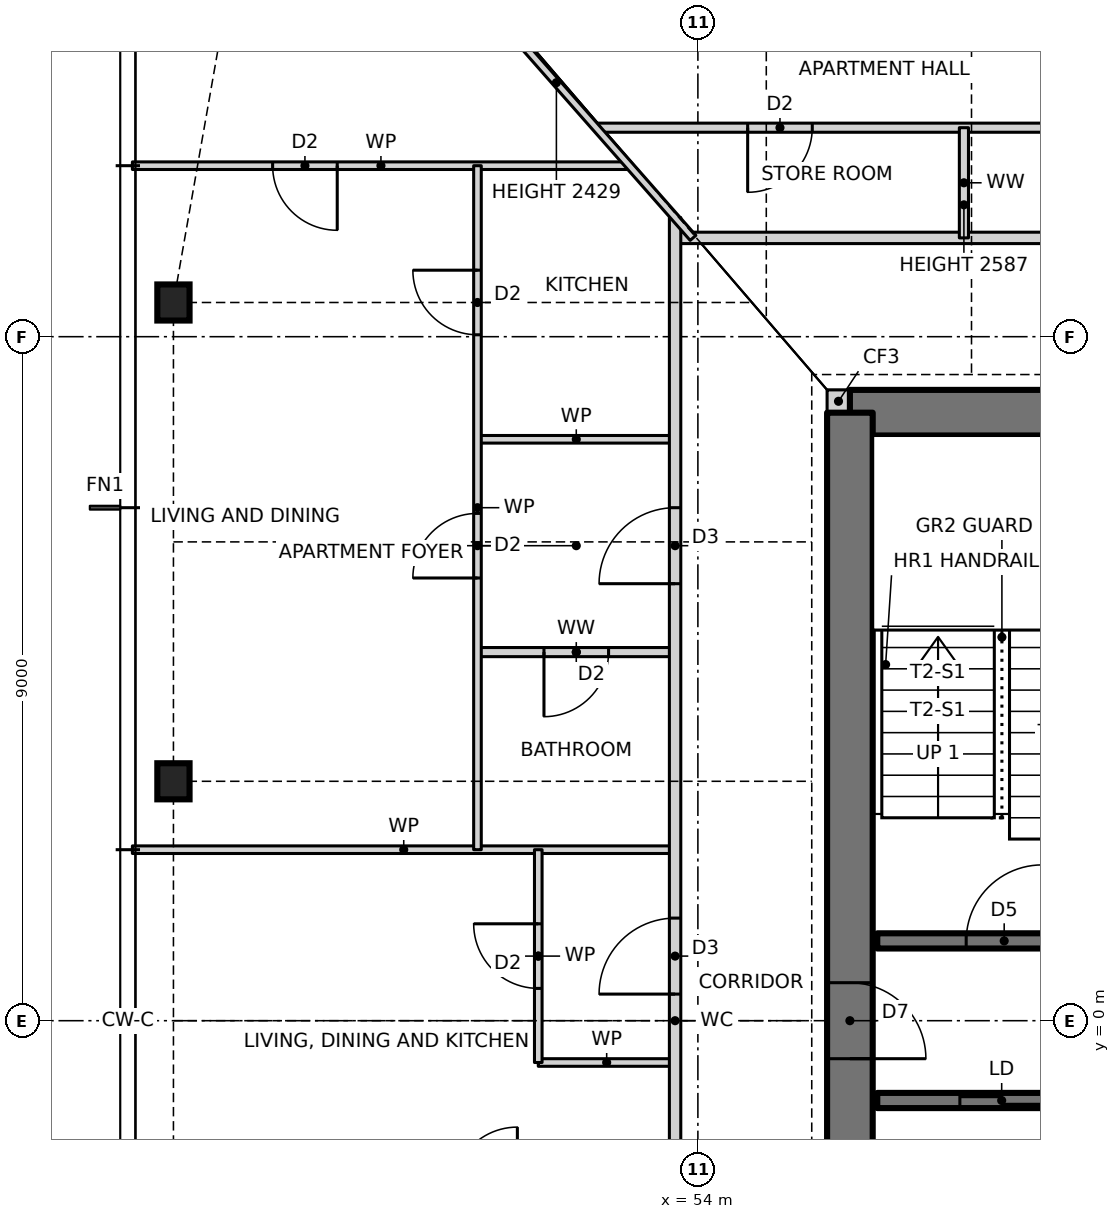
"""IFC4 building model, lengths in metres.
Left out: names, types, materials, properties, quantities, classifications, styles, units other than length and angle.
Written with IfcOpenShell. Run it as: python <this file> out.ifc"""

import sys

from ifc_helpers import new_model, si_unit, direction, frame, frame_2d, origin, origin_2d, place, context, subcontext, project, spatial, rectangle, i_section, extrude, element, fill, save


model = new_model("IFC4")
c1 = context("Model", 3, precision=1e-05, world=origin(), true_north=direction((0.0, 1.0)))
c2 = subcontext(c1, "Body", "Model", "MODEL_VIEW")
j1 = project(units=[si_unit("LENGTHUNIT", "METRE"), si_unit("PLANEANGLEUNIT", "RADIAN")], contexts=[c1])
p1 = place(None, origin())
s1 = spatial("IfcSite", under=j1, at=p1, CompositionType="ELEMENT")
p2 = place(p1, origin())
s2 = spatial("IfcBuilding", under=s1, at=p2, CompositionType="ELEMENT")
p3 = place(p2, frame((0.0, 0.0, 46.5)))
s3 = spatial("IfcBuildingStorey", under=s2, at=p3, CompositionType="ELEMENT", Elevation=46.5)
for number, where, z_axis, x_axis in (
    (1, (47.1, 9.45, 0.0), (0.0, 0.0, 1.0), (1.0, 0.0, 0.0)),
    (2, (47.1, 3.15, 0.0), (0.0, 0.0, 1.0), (1.0, 0.0, 0.0)),
):
    element("IfcColumn", number, at=place(p3, frame(where, z_axis=z_axis, x_axis=x_axis)), inside=s3, PredefinedType="COLUMN", context=c2, shape_type="SweptSolid", body=[
        extrude(i_section(OverallWidth=0.424, OverallDepth=0.475, WebThickness=0.048, FlangeThickness=0.077, at=origin_2d()), origin(), (0.0, 0.0, 1.0), 3.5),
    ])
p4 = place(p3, frame((55.7, 8.15, 0.0), z_axis=(0.0, 0.0, 1.0), x_axis=(1.0, 0.0, 0.0)))
e3 = element("IfcWall", 3, at=p4, inside=s3, PredefinedType="SOLIDWALL", context=c2, shape_type="SweptSolid", body=[
    extrude(rectangle(XDim=0.3, YDim=0.3, at=frame_2d((0.15, 0.0))), origin(), (0.0, 0.0, 1.0), 3.5),
])
p5 = place(p3, frame((70.0, 8.0, 0.0), z_axis=(0.0, 0.0, 1.0), x_axis=(-1.0, 0.0, 0.0)))
e4 = element("IfcWall", 4, at=p5, inside=s3, PredefinedType="SHEAR", context=c2, shape_type="SweptSolid", body=[
    extrude(rectangle(XDim=14.0, YDim=0.6, at=frame_2d((7.0, 0.0))), origin(), (0.0, 0.0, 1.0), 3.5),
])
p6 = place(p5, frame((8.2, 0.0, 0.0)))
e5 = element("IfcOpeningElement", 5, at=p6, cuts=e4, PredefinedType="OPENING", context=c2, shape_type="SweptSolid", body=[
    extrude(rectangle(XDim=0.9, YDim=2.1, at=frame_2d((0.45, 1.05))), frame((0.0, 0.31, 0.0), z_axis=(0.0, -1.0, 0.0), x_axis=(1.0, 0.0, 0.0)), (0.0, 0.0, 1.0), 0.62),
])
p7 = place(p5, frame((3.2, 0.0, 0.0)))
e6 = element("IfcOpeningElement", 6, at=p7, cuts=e4, PredefinedType="OPENING", context=c2, shape_type="SweptSolid", body=[
    extrude(rectangle(XDim=0.9, YDim=2.1, at=frame_2d((0.45, 1.05))), frame((0.0, 0.31, 0.0), z_axis=(0.0, -1.0, 0.0), x_axis=(1.0, 0.0, 0.0)), (0.0, 0.0, 1.0), 0.62),
])
p8 = place(p3, frame((56.0, 8.0, 0.0), z_axis=(0.0, 0.0, 1.0), x_axis=(0.0, -1.0, 0.0)))
e7 = element("IfcWall", 7, at=p8, inside=s3, PredefinedType="SHEAR", context=c2, shape_type="SweptSolid", body=[
    extrude(rectangle(XDim=16.0, YDim=0.6, at=frame_2d((8.0, 0.0))), origin(), (0.0, 0.0, 1.0), 3.5),
])
p9 = place(p8, frame((7.5, 0.0, 0.0)))
e8 = element("IfcOpeningElement", 8, at=p9, cuts=e7, PredefinedType="OPENING", context=c2, shape_type="SweptSolid", body=[
    extrude(rectangle(XDim=1.0, YDim=2.1, at=frame_2d((0.5, 1.05))), frame((0.0, 0.31, 0.0), z_axis=(0.0, -1.0, 0.0), x_axis=(1.0, 0.0, 0.0)), (0.0, 0.0, 1.0), 0.62),
])
p10 = place(p3, frame((56.36, -1.05, 0.0), z_axis=(0.0, 0.0, 1.0), x_axis=(1.0, 0.0, 0.0)))
e9 = element("IfcWall", 9, at=p10, inside=s3, PredefinedType="SOLIDWALL", context=c2, shape_type="SweptSolid", body=[
    extrude(rectangle(XDim=13.28, YDim=0.2, at=frame_2d((6.64, 0.0))), origin(), (0.0, 0.0, 1.0), 3.5),
])
p11 = place(p10, frame((11.11, 0.0, 0.0)))
e10 = element("IfcOpeningElement", 10, at=p11, cuts=e9, PredefinedType="OPENING", context=c2, shape_type="SweptSolid", body=[
    extrude(rectangle(XDim=1.0, YDim=2.1, at=frame_2d((0.5, 1.05))), frame((0.0, 0.11, 0.0), z_axis=(0.0, -1.0, 0.0), x_axis=(1.0, 0.0, 0.0)), (0.0, 0.0, 1.0), 0.22),
])
p12 = place(p10, frame((1.087, 0.0, 0.0)))
e11 = element("IfcOpeningElement", 11, at=p12, cuts=e9, PredefinedType="OPENING", context=c2, shape_type="SweptSolid", body=[
    extrude(rectangle(XDim=1.1, YDim=2.1, at=frame_2d((0.55, 1.05))), frame((0.0, 0.11, 0.0), z_axis=(0.0, -1.0, 0.0), x_axis=(1.0, 0.0, 0.0)), (0.0, 0.0, 1.0), 0.22),
])
p13 = place(p10, frame((4.39, 0.0, 0.0)))
e12 = element("IfcOpeningElement", 12, at=p13, cuts=e9, PredefinedType="OPENING", context=c2, shape_type="SweptSolid", body=[
    extrude(rectangle(XDim=1.1, YDim=2.1, at=frame_2d((0.55, 1.05))), frame((0.0, 0.11, 0.0), z_axis=(0.0, -1.0, 0.0), x_axis=(1.0, 0.0, 0.0)), (0.0, 0.0, 1.0), 0.22),
])
p14 = place(p10, frame((7.724, 0.0, 0.0)))
e13 = element("IfcOpeningElement", 13, at=p14, cuts=e9, PredefinedType="OPENING", context=c2, shape_type="SweptSolid", body=[
    extrude(rectangle(XDim=1.1, YDim=2.1, at=frame_2d((0.55, 1.05))), frame((0.0, 0.11, 0.0), z_axis=(0.0, -1.0, 0.0), x_axis=(1.0, 0.0, 0.0)), (0.0, 0.0, 1.0), 0.22),
])
p15 = place(p3, frame((51.9, -0.55, 0.0), z_axis=(0.0, 0.0, 1.0), x_axis=(1.0, 0.0, 0.0)))
e14 = element("IfcWall", 14, at=p15, inside=s3, PredefinedType="PARTITIONING", context=c2, shape_type="SweptSolid", body=[
    extrude(rectangle(XDim=1.8, YDim=0.1, at=frame_2d((0.9, 0.0))), origin(), (0.0, 0.0, 1.0), 3.27),
])
p16 = place(p3, frame((56.36, 1.05, 0.0), z_axis=(0.0, 0.0, 1.0), x_axis=(1.0, 0.0, 0.0)))
e15 = element("IfcWall", 15, at=p16, inside=s3, PredefinedType="SOLIDWALL", context=c2, shape_type="SweptSolid", body=[
    extrude(rectangle(XDim=13.28, YDim=0.2, at=frame_2d((6.64, 0.0))), origin(), (0.0, 0.0, 1.0), 3.5),
])
p17 = place(p16, frame((1.17, 0.0, 0.0)))
e16 = element("IfcOpeningElement", 16, at=p17, cuts=e15, PredefinedType="OPENING", context=c2, shape_type="SweptSolid", body=[
    extrude(rectangle(XDim=1.0, YDim=2.1, at=frame_2d((0.5, 1.05))), frame((0.0, 0.11, 0.0), z_axis=(0.0, -1.0, 0.0), x_axis=(1.0, 0.0, 0.0)), (0.0, 0.0, 1.0), 0.22),
])
p18 = place(p16, frame((6.94, 0.0, 0.0)))
e17 = element("IfcOpeningElement", 17, at=p18, cuts=e15, PredefinedType="OPENING", context=c2, shape_type="SweptSolid", body=[
    extrude(rectangle(XDim=0.9, YDim=2.1, at=frame_2d((0.45, 1.05))), frame((0.0, 0.11, 0.0), z_axis=(0.0, -1.0, 0.0), x_axis=(1.0, 0.0, 0.0)), (0.0, 0.0, 1.0), 0.22),
])
p19 = place(p16, frame((3.64, 0.0, 0.0)))
e18 = element("IfcOpeningElement", 18, at=p19, cuts=e15, PredefinedType="OPENING", context=c2, shape_type="SweptSolid", body=[
    extrude(rectangle(XDim=0.9, YDim=2.1, at=frame_2d((0.45, 1.05))), frame((0.0, 0.11, 0.0), z_axis=(0.0, -1.0, 0.0), x_axis=(1.0, 0.0, 0.0)), (0.0, 0.0, 1.0), 0.22),
])
p20 = place(p16, frame((10.96, 0.0, 0.0)))
e19 = element("IfcOpeningElement", 19, at=p20, cuts=e15, PredefinedType="OPENING", context=c2, shape_type="SweptSolid", body=[
    extrude(rectangle(XDim=1.3, YDim=2.1, at=frame_2d((0.65, 1.05))), frame((0.0, 0.11, 0.0), z_axis=(0.0, -1.0, 0.0), x_axis=(1.0, 0.0, 0.0)), (0.0, 0.0, 1.0), 0.22),
])
p21 = place(p3, frame((46.56, 2.25, 0.0), z_axis=(0.0, 0.0, 1.0), x_axis=(1.0, 0.0, 0.0)))
e20 = element("IfcWall", 20, at=p21, inside=s3, PredefinedType="PARTITIONING", context=c2, shape_type="SweptSolid", body=[
    extrude(rectangle(XDim=7.14, YDim=0.1, at=frame_2d((3.57, 0.0))), origin(), (0.0, 0.0, 1.0), 3.27),
])
p22 = place(p3, frame((51.1, 4.85, 0.0), z_axis=(0.0, 0.0, 1.0), x_axis=(1.0, 0.0, 0.0)))
e21 = element("IfcWall", 21, at=p22, inside=s3, PredefinedType="PARTITIONING", context=c2, shape_type="SweptSolid", body=[
    extrude(rectangle(XDim=2.6, YDim=0.12, at=frame_2d((1.3, 0.0))), origin(), (0.0, 0.0, 1.0), 3.27),
])
p23 = place(p22, frame((0.875, 0.0, 0.0)))
e22 = element("IfcOpeningElement", 22, at=p23, cuts=e21, PredefinedType="OPENING", context=c2, shape_type="SweptSolid", body=[
    extrude(rectangle(XDim=0.85, YDim=2.1, at=frame_2d((0.425, 1.05))), frame((0.0, 0.07, 0.0), z_axis=(0.0, -1.0, 0.0), x_axis=(1.0, 0.0, 0.0)), (0.0, 0.0, 1.0), 0.14),
])
p24 = place(p3, frame((51.1, 7.65, 0.0), z_axis=(0.0, 0.0, 1.0), x_axis=(1.0, 0.0, 0.0)))
e23 = element("IfcWall", 23, at=p24, inside=s3, PredefinedType="PARTITIONING", context=c2, shape_type="SweptSolid", body=[
    extrude(rectangle(XDim=2.6, YDim=0.1, at=frame_2d((1.3, 0.0))), origin(), (0.0, 0.0, 1.0), 3.27),
])
p25 = place(p3, frame((53.7, 10.3, 0.0), z_axis=(0.0, 0.0, 1.0), x_axis=(1.0, 0.0, 0.0)))
e24 = element("IfcWall", 24, at=p25, inside=s3, PredefinedType="PARTITIONING", context=c2, shape_type="SweptSolid", body=[
    extrude(rectangle(XDim=18.6, YDim=0.15, at=frame_2d((9.3, 0.0))), origin(), (0.0, 0.0, 1.0), 3.27),
])
p26 = place(p25, frame((12.8, 0.0, 0.0)))
e25 = element("IfcOpeningElement", 25, at=p26, cuts=e24, PredefinedType="OPENING", context=c2, shape_type="SweptSolid", body=[
    extrude(rectangle(XDim=1.0, YDim=2.1, at=frame_2d((0.5, 1.05))), frame((0.0, 0.085, 0.0), z_axis=(0.0, -1.0, 0.0), x_axis=(1.0, 0.0, 0.0)), (0.0, 0.0, 1.0), 0.17),
])
p27 = place(p3, frame((46.56, 11.25, 0.0), z_axis=(0.0, 0.0, 1.0), x_axis=(1.0, 0.0, 0.0)))
e26 = element("IfcWall", 26, at=p27, inside=s3, PredefinedType="PARTITIONING", context=c2, shape_type="SweptSolid", body=[
    extrude(rectangle(XDim=6.54, YDim=0.1, at=frame_2d((3.27, 0.0))), origin(), (0.0, 0.0, 1.0), 3.27),
])
p28 = place(p27, frame((1.845, 0.0, 0.0)))
e27 = element("IfcOpeningElement", 27, at=p28, cuts=e26, PredefinedType="OPENING", context=c2, shape_type="SweptSolid", body=[
    extrude(rectangle(XDim=0.85, YDim=2.1, at=frame_2d((0.425, 1.05))), frame((0.0, 0.06, 0.0), z_axis=(0.0, -1.0, 0.0), x_axis=(1.0, 0.0, 0.0)), (0.0, 0.0, 1.0), 0.12),
])
p29 = place(p3, frame((52.66, 11.75, 0.0), z_axis=(0.0, 0.0, 1.0), x_axis=(1.0, 0.0, 0.0)))
e28 = element("IfcWall", 28, at=p29, inside=s3, PredefinedType="PARTITIONING", context=c2, shape_type="SweptSolid", body=[
    extrude(rectangle(XDim=19.34, YDim=0.12, at=frame_2d((9.67, 0.0))), origin(), (0.0, 0.0, 1.0), 3.27),
])
p30 = place(p29, frame((17.115, 0.0, 0.0)))
e29 = element("IfcOpeningElement", 29, at=p30, cuts=e28, PredefinedType="OPENING", context=c2, shape_type="SweptSolid", body=[
    extrude(rectangle(XDim=0.85, YDim=2.1, at=frame_2d((0.425, 1.05))), frame((0.0, 0.07, 0.0), z_axis=(0.0, -1.0, 0.0), x_axis=(1.0, 0.0, 0.0)), (0.0, 0.0, 1.0), 0.14),
])
p31 = place(p29, frame((13.915, 0.0, 0.0)))
e30 = element("IfcOpeningElement", 30, at=p31, cuts=e28, PredefinedType="OPENING", context=c2, shape_type="SweptSolid", body=[
    extrude(rectangle(XDim=0.85, YDim=2.1, at=frame_2d((0.425, 1.05))), frame((0.0, 0.07, 0.0), z_axis=(0.0, -1.0, 0.0), x_axis=(1.0, 0.0, 0.0)), (0.0, 0.0, 1.0), 0.14),
])
p32 = place(p29, frame((7.165, 0.0, 0.0)))
e31 = element("IfcOpeningElement", 31, at=p32, cuts=e28, PredefinedType="OPENING", context=c2, shape_type="SweptSolid", body=[
    extrude(rectangle(XDim=0.85, YDim=2.1, at=frame_2d((0.425, 1.05))), frame((0.0, 0.07, 0.0), z_axis=(0.0, -1.0, 0.0), x_axis=(1.0, 0.0, 0.0)), (0.0, 0.0, 1.0), 0.14),
])
p33 = place(p29, frame((1.995, 0.0, 0.0)))
e32 = element("IfcOpeningElement", 32, at=p33, cuts=e28, PredefinedType="OPENING", context=c2, shape_type="SweptSolid", body=[
    extrude(rectangle(XDim=0.85, YDim=2.1, at=frame_2d((0.425, 1.05))), frame((0.0, 0.07, 0.0), z_axis=(0.0, -1.0, 0.0), x_axis=(1.0, 0.0, 0.0)), (0.0, 0.0, 1.0), 0.14),
])
p34 = place(p3, frame((57.5, 10.3, 0.0), z_axis=(0.0, 0.0, 1.0), x_axis=(0.0, 1.0, 0.0)))
e33 = element("IfcWall", 33, at=p34, inside=s3, PredefinedType="PARTITIONING", context=c2, shape_type="SweptSolid", body=[
    extrude(rectangle(XDim=1.45, YDim=0.12, at=frame_2d((0.725, 0.0))), origin(), (0.0, 0.0, 1.0), 2.587),
])
p35 = place(p3, frame((53.7, -10.568, 0.0), z_axis=(0.0, 0.0, 1.0), x_axis=(0.0, 1.0, 0.0)))
e34 = element("IfcWall", 34, at=p35, inside=s3, PredefinedType="PARTITIONING", context=c2, shape_type="SweptSolid", body=[
    extrude(rectangle(XDim=21.136, YDim=0.15, at=frame_2d((10.568, 0.0))), origin(), (0.0, 0.0, 1.0), 3.27),
])
p36 = place(p35, frame((16.318, 0.0, 0.0)))
e35 = element("IfcOpeningElement", 35, at=p36, cuts=e34, PredefinedType="OPENING", context=c2, shape_type="SweptSolid", body=[
    extrude(rectangle(XDim=1.0, YDim=2.1, at=frame_2d((0.5, 1.05))), frame((0.0, 0.085, 0.0), z_axis=(0.0, -1.0, 0.0), x_axis=(1.0, 0.0, 0.0)), (0.0, 0.0, 1.0), 0.17),
])
p37 = place(p35, frame((10.918, 0.0, 0.0)))
e36 = element("IfcOpeningElement", 36, at=p37, cuts=e34, PredefinedType="OPENING", context=c2, shape_type="SweptSolid", body=[
    extrude(rectangle(XDim=1.0, YDim=2.1, at=frame_2d((0.5, 1.05))), frame((0.0, 0.085, 0.0), z_axis=(0.0, -1.0, 0.0), x_axis=(1.0, 0.0, 0.0)), (0.0, 0.0, 1.0), 0.17),
])
p38 = place(p3, frame((51.9, -0.55, 0.0), z_axis=(0.0, 0.0, 1.0), x_axis=(0.0, 1.0, 0.0)))
e37 = element("IfcWall", 37, at=p38, inside=s3, PredefinedType="PARTITIONING", context=c2, shape_type="SweptSolid", body=[
    extrude(rectangle(XDim=2.8, YDim=0.1, at=frame_2d((1.4, 0.0))), origin(), (0.0, 0.0, 1.0), 3.27),
])
p39 = place(p38, frame((0.975, 0.0, 0.0)))
e38 = element("IfcOpeningElement", 38, at=p39, cuts=e37, PredefinedType="OPENING", context=c2, shape_type="SweptSolid", body=[
    extrude(rectangle(XDim=0.85, YDim=2.1, at=frame_2d((0.425, 1.05))), frame((0.0, 0.06, 0.0), z_axis=(0.0, -1.0, 0.0), x_axis=(1.0, 0.0, 0.0)), (0.0, 0.0, 1.0), 0.12),
])
p40 = place(p3, frame((51.8, 12.727, 0.0), z_axis=(0.0, 0.0, 1.0), x_axis=(0.0, 1.0, 0.0)))
e39 = element("IfcWall", 39, at=p40, inside=s3, PredefinedType="PARTITIONING", context=c2, shape_type="SweptSolid", body=[
    extrude(rectangle(XDim=0.423, YDim=0.1, at=frame_2d((0.211, 0.0))), origin(), (0.0, 0.0, 1.0), 3.27),
])
p41 = place(p3, frame((51.1, 2.25, 0.0), z_axis=(0.0, 0.0, 1.0), x_axis=(0.0, 1.0, 0.0)))
e40 = element("IfcWall", 40, at=p41, inside=s3, PredefinedType="PARTITIONING", context=c2, shape_type="SweptSolid", body=[
    extrude(rectangle(XDim=9.0, YDim=0.1, at=frame_2d((4.5, 0.0))), origin(), (0.0, 0.0, 1.0), 3.27),
])
p42 = place(p41, frame((6.775, 0.0, 0.0)))
e41 = element("IfcOpeningElement", 41, at=p42, cuts=e40, PredefinedType="OPENING", context=c2, shape_type="SweptSolid", body=[
    extrude(rectangle(XDim=0.85, YDim=2.1, at=frame_2d((0.425, 1.05))), frame((0.0, 0.06, 0.0), z_axis=(0.0, -1.0, 0.0), x_axis=(1.0, 0.0, 0.0)), (0.0, 0.0, 1.0), 0.12),
])
p43 = place(p41, frame((3.575, 0.0, 0.0)))
e42 = element("IfcOpeningElement", 42, at=p43, cuts=e40, PredefinedType="OPENING", context=c2, shape_type="SweptSolid", body=[
    extrude(rectangle(XDim=0.85, YDim=2.1, at=frame_2d((0.425, 1.05))), frame((0.0, 0.06, 0.0), z_axis=(0.0, -1.0, 0.0), x_axis=(1.0, 0.0, 0.0)), (0.0, 0.0, 1.0), 0.12),
])
p44 = place(p3, frame((53.936, 10.3, 0.0), z_axis=(0.0, 0.0, 1.0), x_axis=(-0.660638210404, 0.750704439146, 0.0)))
e43 = element("IfcWall", 43, at=p44, inside=s3, PredefinedType="PARTITIONING", context=c2, shape_type="SweptSolid", body=[
    extrude(rectangle(XDim=9.07, YDim=0.1, at=frame_2d((4.535, 0.0))), origin(), (0.0, 0.0, 1.0), 2.429),
])
p45 = place(p17, origin())
e44 = element("IfcDoor", 44, at=p45, inside=s3, OperationType="SINGLE_SWING_RIGHT", PredefinedType="DOOR", context=c2, shape_type="SweptSolid", body=[
    extrude(rectangle(XDim=1.0, YDim=2.1, at=frame_2d((0.5, 1.05))), frame((0.0, 0.025, 0.0), z_axis=(0.0, -1.0, 0.0), x_axis=(1.0, 0.0, 0.0)), (0.0, 0.0, 1.0), 0.05),
])
fill(e16, e44)
p46 = place(p33, frame((0.85, 0.0, 0.0), z_axis=(0.0, 0.0, 1.0), x_axis=(-1.0, 0.0, 0.0)))
e45 = element("IfcDoor", 45, at=p46, inside=s3, OperationType="SINGLE_SWING_RIGHT", PredefinedType="DOOR", context=c2, shape_type="SweptSolid", body=[
    extrude(rectangle(XDim=0.85, YDim=2.1, at=frame_2d((0.425, 1.05))), frame((0.0, 0.025, 0.0), z_axis=(0.0, -1.0, 0.0), x_axis=(1.0, 0.0, 0.0)), (0.0, 0.0, 1.0), 0.05),
])
fill(e32, e45)
p47 = place(p42, origin())
e46 = element("IfcDoor", 46, at=p47, inside=s3, OperationType="SINGLE_SWING_RIGHT", PredefinedType="DOOR", context=c2, shape_type="SweptSolid", body=[
    extrude(rectangle(XDim=0.85, YDim=2.1, at=frame_2d((0.425, 1.05))), frame((0.0, 0.025, 0.0), z_axis=(0.0, -1.0, 0.0), x_axis=(1.0, 0.0, 0.0)), (0.0, 0.0, 1.0), 0.05),
])
fill(e41, e46)
p48 = place(p36, origin())
e47 = element("IfcDoor", 47, at=p48, inside=s3, OperationType="SINGLE_SWING_LEFT", PredefinedType="DOOR", context=c2, shape_type="SweptSolid", body=[
    extrude(rectangle(XDim=1.0, YDim=2.1, at=frame_2d((0.5, 1.05))), frame((0.0, 0.025, 0.0), z_axis=(0.0, -1.0, 0.0), x_axis=(1.0, 0.0, 0.0)), (0.0, 0.0, 1.0), 0.05),
])
fill(e35, e47)
p49 = place(p43, origin())
e48 = element("IfcDoor", 48, at=p49, inside=s3, OperationType="SINGLE_SWING_LEFT", PredefinedType="DOOR", context=c2, shape_type="SweptSolid", body=[
    extrude(rectangle(XDim=0.85, YDim=2.1, at=frame_2d((0.425, 1.05))), frame((0.0, 0.025, 0.0), z_axis=(0.0, -1.0, 0.0), x_axis=(1.0, 0.0, 0.0)), (0.0, 0.0, 1.0), 0.05),
])
fill(e42, e48)
p50 = place(p23, frame((0.85, 0.0, 0.0), z_axis=(0.0, 0.0, 1.0), x_axis=(-1.0, 0.0, 0.0)))
e49 = element("IfcDoor", 49, at=p50, inside=s3, OperationType="SINGLE_SWING_RIGHT", PredefinedType="DOOR", context=c2, shape_type="SweptSolid", body=[
    extrude(rectangle(XDim=0.85, YDim=2.1, at=frame_2d((0.425, 1.05))), frame((0.0, 0.025, 0.0), z_axis=(0.0, -1.0, 0.0), x_axis=(1.0, 0.0, 0.0)), (0.0, 0.0, 1.0), 0.05),
])
fill(e22, e49)
p51 = place(p28, frame((0.85, 0.0, 0.0), z_axis=(0.0, 0.0, 1.0), x_axis=(-1.0, 0.0, 0.0)))
e50 = element("IfcDoor", 50, at=p51, inside=s3, OperationType="SINGLE_SWING_LEFT", PredefinedType="DOOR", context=c2, shape_type="SweptSolid", body=[
    extrude(rectangle(XDim=0.85, YDim=2.1, at=frame_2d((0.425, 1.05))), frame((0.0, 0.025, 0.0), z_axis=(0.0, -1.0, 0.0), x_axis=(1.0, 0.0, 0.0)), (0.0, 0.0, 1.0), 0.05),
])
fill(e27, e50)
p52 = place(p37, origin())
e51 = element("IfcDoor", 51, at=p52, inside=s3, OperationType="SINGLE_SWING_LEFT", PredefinedType="DOOR", context=c2, shape_type="SweptSolid", body=[
    extrude(rectangle(XDim=1.0, YDim=2.1, at=frame_2d((0.5, 1.05))), frame((0.0, 0.025, 0.0), z_axis=(0.0, -1.0, 0.0), x_axis=(1.0, 0.0, 0.0)), (0.0, 0.0, 1.0), 0.05),
])
fill(e36, e51)
p53 = place(p39, origin())
e52 = element("IfcDoor", 52, at=p53, inside=s3, OperationType="SINGLE_SWING_RIGHT", PredefinedType="DOOR", context=c2, shape_type="SweptSolid", body=[
    extrude(rectangle(XDim=0.85, YDim=2.1, at=frame_2d((0.425, 1.05))), frame((0.0, 0.025, 0.0), z_axis=(0.0, -1.0, 0.0), x_axis=(1.0, 0.0, 0.0)), (0.0, 0.0, 1.0), 0.05),
])
fill(e38, e52)
p54 = place(p9, origin())
e53 = element("IfcDoor", 53, at=p54, inside=s3, OperationType="SINGLE_SWING_RIGHT", PredefinedType="DOOR", context=c2, shape_type="SweptSolid", body=[
    extrude(rectangle(XDim=1.0, YDim=2.1, at=frame_2d((0.5, 1.05))), frame((0.0, 0.025, 0.0), z_axis=(0.0, -1.0, 0.0), x_axis=(1.0, 0.0, 0.0)), (0.0, 0.0, 1.0), 0.05),
])
fill(e8, e53)
p55 = place(p12, origin())
e54 = element("IfcDoor", 54, at=p55, inside=s3, OperationType="DOUBLE_DOOR_SLIDING", PredefinedType="DOOR", context=c2, shape_type="SweptSolid", body=[
    extrude(rectangle(XDim=1.1, YDim=2.1, at=frame_2d((0.55, 1.05))), frame((0.0, 0.025, 0.0), z_axis=(0.0, -1.0, 0.0), x_axis=(1.0, 0.0, 0.0)), (0.0, 0.0, 1.0), 0.05),
])
fill(e11, e54)
save(model, sys.argv[1])
